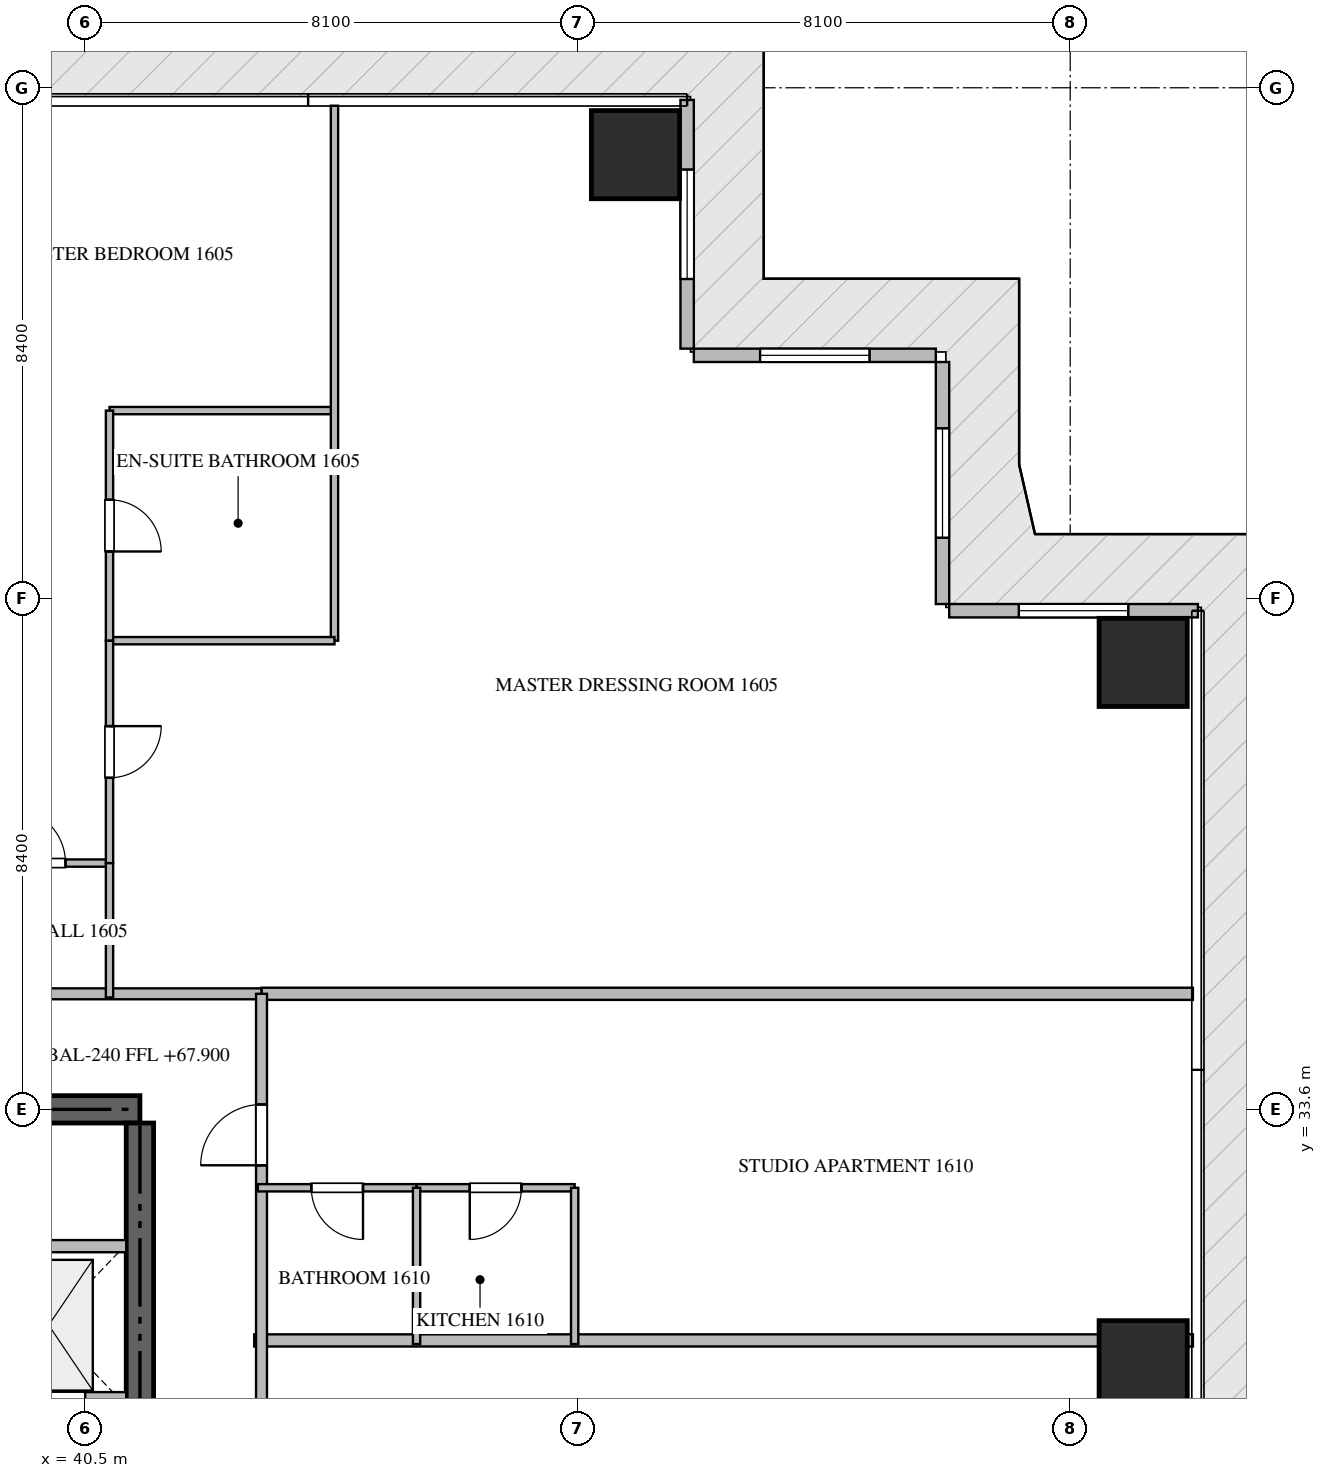
"""IFC4 building model, lengths in metres.
Left out: names, types, materials, properties, quantities, classifications, styles, units other than length and angle.
Written with IfcOpenShell. Run it as: python <this file> out.ifc"""

import sys

from ifc_helpers import new_model, si_unit, direction, frame, frame_2d, origin, origin_2d, place, context, subcontext, project, spatial, rectangle, extrude, source, transform, mapped, element, fill, save


model = new_model("IFC4")
c1 = context("Model", 3, precision=1e-05, world=origin(), true_north=direction((0.0, 1.0)))
c2 = subcontext(c1, "Body", "Model", "MODEL_VIEW")
j1 = project(units=[si_unit("LENGTHUNIT", "METRE"), si_unit("PLANEANGLEUNIT", "RADIAN")], contexts=[c1])
p1 = place(None, origin())
s1 = spatial("IfcSite", under=j1, at=p1, CompositionType="ELEMENT")
p2 = place(p1, origin())
s2 = spatial("IfcBuilding", under=s1, at=p2, CompositionType="ELEMENT")
p3 = place(p2, frame((0.0, 0.0, 67.95)))
s3 = spatial("IfcBuildingStorey", under=s2, at=p3, CompositionType="ELEMENT", Elevation=67.95)
p4 = place(p3, frame((41.4, 33.6, -0.26), z_axis=(0.0, 0.0, 1.0), x_axis=(-1.0, 0.0, 0.0)))
e1 = element("IfcWall", 1, at=p4, inside=s3, PredefinedType="SHEAR", context=c2, shape_type="SweptSolid", body=[
    extrude(rectangle(XDim=18.0, YDim=0.45, at=frame_2d((9.0, 0.0))), origin(), (0.0, 0.0, 1.0), 3.748),
])
p5 = place(p3, frame((41.4, 27.75, -0.26), z_axis=(0.0, 0.0, 1.0), x_axis=(0.0, 1.0, 0.0)))
e2 = element("IfcWall", 2, at=p5, inside=s3, PredefinedType="SHEAR", context=c2, shape_type="SweptSolid", body=[
    extrude(rectangle(XDim=5.625, YDim=0.45, at=frame_2d((2.812, 0.0))), origin(), (0.0, 0.0, 1.0), 3.748),
])
m1 = source(origin(), c2, "Body", "SweptSolid", [
    extrude(rectangle(XDim=1.45, YDim=1.45, at=origin_2d()), origin(), (0.0, 0.0, 1.0), 3.75),
])
for number, where, z_axis, x_axis in (
    (3, (49.55, 49.3, -0.26), (0.0, 0.0, 1.0), (1.0, 0.0, 0.0)),
    (4, (57.9, 29.4, -0.26), (0.0, 0.0, 1.0), (1.0, 0.0, 0.0)),
    (5, (57.9, 40.95, -0.26), (0.0, 0.0, 1.0), (1.0, 0.0, 0.0)),
):
    element("IfcColumn", number, at=place(p3, frame(where, z_axis=z_axis, x_axis=x_axis)), inside=s3, PredefinedType="COLUMN", context=c2, shape_type="MappedRepresentation", body=[
        mapped(m1, transform((0.0, 0.0, 0.0), scale=1.0)),
    ])
p6 = place(p3, frame((58.8, 41.8, 0.0), z_axis=(0.0, 0.0, 1.0), x_axis=(-1.0, 0.0, 0.0)))
e6 = element("IfcWall", 6, at=p6, inside=s3, PredefinedType="ELEMENTEDWALL", context=c2, shape_type="SweptSolid", body=[
    extrude(rectangle(XDim=4.09, YDim=0.22, at=frame_2d((2.045, 0.0))), origin(), (0.0, 0.0, 1.0), 3.475),
])
p7 = place(p6, frame((1.145, 0.0, 0.65)))
e7 = element("IfcOpeningElement", 7, at=p7, cuts=e6, PredefinedType="OPENING", context=c2, shape_type="SweptSolid", body=[
    extrude(rectangle(XDim=1.8, YDim=2.1, at=frame_2d((0.9, 1.05))), frame((0.0, 0.12, 0.0), z_axis=(0.0, -1.0, 0.0), x_axis=(1.0, 0.0, 0.0)), (0.0, 0.0, 1.0), 0.24),
])
p8 = place(p3, frame((54.6, 41.91, 0.0), z_axis=(0.0, 0.0, 1.0), x_axis=(0.0, 1.0, 0.0)))
e8 = element("IfcWall", 8, at=p8, inside=s3, PredefinedType="ELEMENTEDWALL", context=c2, shape_type="SweptSolid", body=[
    extrude(rectangle(XDim=3.98, YDim=0.22, at=frame_2d((1.99, 0.0))), origin(), (0.0, 0.0, 1.0), 3.475),
])
p9 = place(p8, frame((1.09, 0.0, 0.65)))
e9 = element("IfcOpeningElement", 9, at=p9, cuts=e8, PredefinedType="OPENING", context=c2, shape_type="SweptSolid", body=[
    extrude(rectangle(XDim=1.8, YDim=2.1, at=frame_2d((0.9, 1.05))), frame((0.0, 0.12, 0.0), z_axis=(0.0, -1.0, 0.0), x_axis=(1.0, 0.0, 0.0)), (0.0, 0.0, 1.0), 0.24),
])
p10 = place(p3, frame((54.49, 46.0, 0.0), z_axis=(0.0, 0.0, 1.0), x_axis=(-1.0, 0.0, 0.0)))
e10 = element("IfcWall", 10, at=p10, inside=s3, PredefinedType="ELEMENTEDWALL", context=c2, shape_type="SweptSolid", body=[
    extrude(rectangle(XDim=3.98, YDim=0.22, at=frame_2d((1.99, 0.0))), origin(), (0.0, 0.0, 1.0), 3.475),
])
p11 = place(p10, frame((1.09, 0.0, 0.65)))
e11 = element("IfcOpeningElement", 11, at=p11, cuts=e10, PredefinedType="OPENING", context=c2, shape_type="SweptSolid", body=[
    extrude(rectangle(XDim=1.8, YDim=2.1, at=frame_2d((0.9, 1.05))), frame((0.0, 0.12, 0.0), z_axis=(0.0, -1.0, 0.0), x_axis=(1.0, 0.0, 0.0)), (0.0, 0.0, 1.0), 0.24),
])
p12 = place(p3, frame((50.4, 46.11, 0.0), z_axis=(0.0, 0.0, 1.0), x_axis=(0.0, 1.0, 0.0)))
e12 = element("IfcWall", 12, at=p12, inside=s3, PredefinedType="ELEMENTEDWALL", context=c2, shape_type="SweptSolid", body=[
    extrude(rectangle(XDim=4.09, YDim=0.22, at=frame_2d((2.045, 0.0))), origin(), (0.0, 0.0, 1.0), 3.475),
])
p13 = place(p12, frame((1.145, 0.0, 0.65)))
e13 = element("IfcOpeningElement", 13, at=p13, cuts=e12, PredefinedType="OPENING", context=c2, shape_type="SweptSolid", body=[
    extrude(rectangle(XDim=1.8, YDim=2.1, at=frame_2d((0.9, 1.05))), frame((0.0, 0.12, 0.0), z_axis=(0.0, -1.0, 0.0), x_axis=(1.0, 0.0, 0.0)), (0.0, 0.0, 1.0), 0.24),
])
p14 = place(p3, frame((38.75, 28.85, 0.0), z_axis=(0.0, 0.0, 1.0), x_axis=(1.0, 0.0, 0.0)))
e14 = element("IfcWall", 14, at=p14, inside=s3, PredefinedType="STANDARD", context=c2, shape_type="SweptSolid", body=[
    extrude(rectangle(XDim=2.425, YDim=0.2, at=frame_2d((1.212, 0.0))), origin(), (0.0, 0.0, 1.0), 3.49),
])
p15 = place(p14, frame((0.55, 0.0, 0.0)))
e15 = element("IfcOpeningElement", 15, at=p15, cuts=e14, PredefinedType="OPENING", context=c2, shape_type="SweptSolid", body=[
    extrude(rectangle(XDim=1.2, YDim=2.2, at=frame_2d((0.6, 1.1))), frame((0.0, 0.11, 0.0), z_axis=(0.0, -1.0, 0.0), x_axis=(1.0, 0.0, 0.0)), (0.0, 0.0, 1.0), 0.22),
])
p16 = place(p3, frame((38.75, 31.35, 0.0), z_axis=(0.0, 0.0, 1.0), x_axis=(1.0, 0.0, 0.0)))
e16 = element("IfcWall", 16, at=p16, inside=s3, PredefinedType="STANDARD", context=c2, shape_type="SweptSolid", body=[
    extrude(rectangle(XDim=2.425, YDim=0.2, at=frame_2d((1.212, 0.0))), origin(), (0.0, 0.0, 1.0), 3.49),
])
p17 = place(p3, frame((43.28, 29.8, 0.0), z_axis=(0.0, 0.0, 1.0), x_axis=(1.0, 0.0, 0.0)))
e17 = element("IfcWall", 17, at=p17, inside=s3, PredefinedType="PARTITIONING", context=c2, shape_type="SweptSolid", body=[
    extrude(rectangle(XDim=15.438, YDim=0.2, at=frame_2d((7.719, 0.0))), origin(), (0.0, 0.0, 1.0), 3.49),
])
p18 = place(p3, frame((43.4, 35.5, 0.0), z_axis=(0.0, 0.0, 1.0), x_axis=(1.0, 0.0, 0.0)))
e18 = element("IfcWall", 18, at=p18, inside=s3, PredefinedType="PARTITIONING", context=c2, shape_type="SweptSolid", body=[
    extrude(rectangle(XDim=15.318, YDim=0.2, at=frame_2d((7.659, 0.0))), origin(), (0.0, 0.0, 1.0), 3.49),
])
p19 = place(p3, frame((21.402, 35.5, 0.0), z_axis=(0.0, 0.0, 1.0), x_axis=(1.0, 0.0, 0.0)))
e19 = element("IfcWall", 19, at=p19, inside=s3, PredefinedType="PARTITIONING", context=c2, shape_type="SweptSolid", body=[
    extrude(rectangle(XDim=21.996, YDim=0.18, at=frame_2d((10.998, 0.0))), origin(), (0.0, 0.0, 1.0), 3.49),
])
p20 = place(p19, frame((7.202, 0.0, 0.0)))
e20 = element("IfcOpeningElement", 20, at=p20, cuts=e19, PredefinedType="OPENING", context=c2, shape_type="SweptSolid", body=[
    extrude(rectangle(XDim=1.0, YDim=2.15, at=frame_2d((0.5, 1.075))), frame((0.0, 0.1, 0.0), z_axis=(0.0, -1.0, 0.0), x_axis=(1.0, 0.0, 0.0)), (0.0, 0.0, 1.0), 0.2),
])
p21 = place(p3, frame((43.4, 14.9, 0.0), z_axis=(0.0, 0.0, 1.0), x_axis=(0.0, 1.0, 0.0)))
e21 = element("IfcWall", 21, at=p21, inside=s3, PredefinedType="PARTITIONING", context=c2, shape_type="SweptSolid", body=[
    extrude(rectangle(XDim=20.6, YDim=0.18, at=frame_2d((10.3, 0.0))), origin(), (0.0, 0.0, 1.0), 3.49),
])
p22 = place(p21, frame((3.469, 0.0, 0.0)))
e22 = element("IfcOpeningElement", 22, at=p22, cuts=e21, PredefinedType="OPENING", context=c2, shape_type="SweptSolid", body=[
    extrude(rectangle(XDim=1.0, YDim=2.15, at=frame_2d((0.5, 1.075))), frame((0.0, 0.1, 0.0), z_axis=(0.0, -1.0, 0.0), x_axis=(1.0, 0.0, 0.0)), (0.0, 0.0, 1.0), 0.2),
])
p23 = place(p21, frame((11.074, 0.0, 0.0)))
e23 = element("IfcOpeningElement", 23, at=p23, cuts=e21, PredefinedType="OPENING", context=c2, shape_type="SweptSolid", body=[
    extrude(rectangle(XDim=1.0, YDim=2.15, at=frame_2d((0.5, 1.075))), frame((0.0, 0.1, 0.0), z_axis=(0.0, -1.0, 0.0), x_axis=(1.0, 0.0, 0.0)), (0.0, 0.0, 1.0), 0.2),
])
p24 = place(p21, frame((17.78, 0.0, 0.0)))
e24 = element("IfcOpeningElement", 24, at=p24, cuts=e21, PredefinedType="OPENING", context=c2, shape_type="SweptSolid", body=[
    extrude(rectangle(XDim=1.0, YDim=2.15, at=frame_2d((0.5, 1.075))), frame((0.0, 0.1, 0.0), z_axis=(0.0, -1.0, 0.0), x_axis=(1.0, 0.0, 0.0)), (0.0, 0.0, 1.0), 0.2),
])
p25 = place(p3, frame((38.552, 37.65, 0.0), z_axis=(0.0, 0.0, 1.0), x_axis=(1.0, 0.0, 0.0)))
e25 = element("IfcWall", 25, at=p25, inside=s3, PredefinedType="PARTITIONING", context=c2, shape_type="SweptSolid", body=[
    extrude(rectangle(XDim=2.348, YDim=0.12, at=frame_2d((1.174, 0.0))), origin(), (0.0, 0.0, 1.0), 3.49),
])
p26 = place(p25, frame((0.724, 0.0, 0.0)))
e26 = element("IfcOpeningElement", 26, at=p26, cuts=e25, PredefinedType="OPENING", context=c2, shape_type="SweptSolid", body=[
    extrude(rectangle(XDim=0.9, YDim=2.1, at=frame_2d((0.45, 1.05))), frame((0.0, 0.07, 0.0), z_axis=(0.0, -1.0, 0.0), x_axis=(1.0, 0.0, 0.0)), (0.0, 0.0, 1.0), 0.14),
])
p27 = place(p3, frame((40.9, 45.091, 0.0), z_axis=(0.0, 0.0, 1.0), x_axis=(1.0, 0.0, 0.0)))
e27 = element("IfcWall", 27, at=p27, inside=s3, PredefinedType="PARTITIONING", context=c2, shape_type="SweptSolid", body=[
    extrude(rectangle(XDim=3.7, YDim=0.12, at=frame_2d((1.85, 0.0))), origin(), (0.0, 0.0, 1.0), 3.49),
])
p28 = place(p3, frame((44.6, 50.105, 0.0), z_axis=(0.0, 0.0, 1.0), x_axis=(0.0, -1.0, 0.0)))
e28 = element("IfcWall", 28, at=p28, inside=s3, PredefinedType="PARTITIONING", context=c2, shape_type="SweptSolid", body=[
    extrude(rectangle(XDim=8.798, YDim=0.12, at=frame_2d((4.399, 0.0))), origin(), (0.0, 0.0, 1.0), 3.49),
])
p29 = place(p3, frame((40.9, 41.307, 0.0), z_axis=(0.0, 0.0, 1.0), x_axis=(1.0, 0.0, 0.0)))
e29 = element("IfcWall", 29, at=p29, inside=s3, PredefinedType="PARTITIONING", context=c2, shape_type="SweptSolid", body=[
    extrude(rectangle(XDim=3.7, YDim=0.12, at=frame_2d((1.85, 0.0))), origin(), (0.0, 0.0, 1.0), 3.49),
])
p30 = place(p3, frame((40.9, 45.091, 0.0), z_axis=(0.0, 0.0, 1.0), x_axis=(0.0, -1.0, 0.0)))
e30 = element("IfcWall", 30, at=p30, inside=s3, PredefinedType="PARTITIONING", context=c2, shape_type="SweptSolid", body=[
    extrude(rectangle(XDim=3.784, YDim=0.12, at=frame_2d((1.892, 0.0))), origin(), (0.0, 0.0, 1.0), 3.49),
])
p31 = place(p30, frame((1.467, 0.0, 0.0)))
e31 = element("IfcOpeningElement", 31, at=p31, cuts=e30, PredefinedType="OPENING", context=c2, shape_type="SweptSolid", body=[
    extrude(rectangle(XDim=0.85, YDim=2.1, at=frame_2d((0.425, 1.05))), frame((0.0, 0.07, 0.0), z_axis=(0.0, -1.0, 0.0), x_axis=(1.0, 0.0, 0.0)), (0.0, 0.0, 1.0), 0.14),
])
p32 = place(p3, frame((40.9, 41.305, 0.0), z_axis=(0.0, 0.0, 1.0), x_axis=(0.0, -1.0, 0.0)))
e32 = element("IfcWall", 32, at=p32, inside=s3, PredefinedType="PARTITIONING", context=c2, shape_type="SweptSolid", body=[
    extrude(rectangle(XDim=3.655, YDim=0.12, at=frame_2d((1.828, 0.0))), origin(), (0.0, 0.0, 1.0), 3.49),
])
p33 = place(p32, frame((1.403, 0.0, 0.0)))
e33 = element("IfcOpeningElement", 33, at=p33, cuts=e32, PredefinedType="OPENING", context=c2, shape_type="SweptSolid", body=[
    extrude(rectangle(XDim=0.85, YDim=2.1, at=frame_2d((0.425, 1.05))), frame((0.0, 0.07, 0.0), z_axis=(0.0, -1.0, 0.0), x_axis=(1.0, 0.0, 0.0)), (0.0, 0.0, 1.0), 0.14),
])
p34 = place(p3, frame((40.9, 37.648, 0.0), z_axis=(0.0, 0.0, 1.0), x_axis=(0.0, -1.0, 0.0)))
e34 = element("IfcWall", 34, at=p34, inside=s3, PredefinedType="PARTITIONING", context=c2, shape_type="SweptSolid", body=[
    extrude(rectangle(XDim=2.208, YDim=0.12, at=frame_2d((1.104, 0.0))), origin(), (0.0, 0.0, 1.0), 3.49),
])
p35 = place(p3, frame((48.55, 32.31, 0.0), z_axis=(0.0, 0.0, 1.0), x_axis=(-1.0, 0.0, 0.0)))
e35 = element("IfcWall", 35, at=p35, inside=s3, PredefinedType="PARTITIONING", context=c2, shape_type="SweptSolid", body=[
    extrude(rectangle(XDim=2.6, YDim=0.12, at=frame_2d((1.3, 0.0))), origin(), (0.0, 0.0, 1.0), 3.49),
])
p36 = place(p35, frame((0.875, 0.0, 0.0)))
e36 = element("IfcOpeningElement", 36, at=p36, cuts=e35, PredefinedType="OPENING", context=c2, shape_type="SweptSolid", body=[
    extrude(rectangle(XDim=0.85, YDim=2.1, at=frame_2d((0.425, 1.05))), frame((0.0, 0.07, 0.0), z_axis=(0.0, -1.0, 0.0), x_axis=(1.0, 0.0, 0.0)), (0.0, 0.0, 1.0), 0.14),
])
p37 = place(p3, frame((45.948, 32.31, 0.0), z_axis=(0.0, 0.0, 1.0), x_axis=(-1.0, 0.0, 0.0)))
e37 = element("IfcWall", 37, at=p37, inside=s3, PredefinedType="PARTITIONING", context=c2, shape_type="SweptSolid", body=[
    extrude(rectangle(XDim=2.608, YDim=0.12, at=frame_2d((1.304, 0.0))), origin(), (0.0, 0.0, 1.0), 3.49),
])
p38 = place(p37, frame((0.879, 0.0, 0.0)))
e38 = element("IfcOpeningElement", 38, at=p38, cuts=e37, PredefinedType="OPENING", context=c2, shape_type="SweptSolid", body=[
    extrude(rectangle(XDim=0.85, YDim=2.1, at=frame_2d((0.425, 1.05))), frame((0.0, 0.07, 0.0), z_axis=(0.0, -1.0, 0.0), x_axis=(1.0, 0.0, 0.0)), (0.0, 0.0, 1.0), 0.14),
])
for number, where, z_axis, x_axis in (
    (39, (45.95, 29.74, 0.0), (0.0, 0.0, 1.0), (0.0, 1.0, 0.0)),
    (40, (48.55, 29.74, 0.0), (0.0, 0.0, 1.0), (0.0, 1.0, 0.0)),
):
    element("IfcWall", number, at=place(p3, frame(where, z_axis=z_axis, x_axis=x_axis)), inside=s3, PredefinedType="PARTITIONING", context=c2, shape_type="SweptSolid", body=[
        extrude(rectangle(XDim=2.57, YDim=0.12, at=frame_2d((1.285, 0.0))), origin(), (0.0, 0.0, 1.0), 3.49),
    ])
m2 = source(origin(), c2, "Body", "SweptSolid", [
    extrude(rectangle(XDim=1.8, YDim=2.1, at=frame_2d((0.9, 1.05))), frame((0.0, 0.03, 0.0), z_axis=(0.0, -1.0, 0.0), x_axis=(1.0, 0.0, 0.0)), (0.0, 0.0, 1.0), 0.06),
])
p39 = place(p7, origin())
e41 = element("IfcWindow", 41, at=p39, inside=s3, PartitioningType="SINGLE_PANEL", PredefinedType="WINDOW", context=c2, shape_type="MappedRepresentation", body=[
    mapped(m2, transform((0.0, 0.0, 0.0), scale=1.0)),
])
fill(e7, e41)
p40 = place(p9, origin())
e42 = element("IfcWindow", 42, at=p40, inside=s3, PartitioningType="SINGLE_PANEL", PredefinedType="WINDOW", context=c2, shape_type="MappedRepresentation", body=[
    mapped(m2, transform((0.0, 0.0, 0.0), scale=1.0)),
])
fill(e9, e42)
p41 = place(p11, origin())
e43 = element("IfcWindow", 43, at=p41, inside=s3, PartitioningType="SINGLE_PANEL", PredefinedType="WINDOW", context=c2, shape_type="MappedRepresentation", body=[
    mapped(m2, transform((0.0, 0.0, 0.0), scale=1.0)),
])
fill(e11, e43)
p42 = place(p13, origin())
e44 = element("IfcWindow", 44, at=p42, inside=s3, PartitioningType="SINGLE_PANEL", PredefinedType="WINDOW", context=c2, shape_type="MappedRepresentation", body=[
    mapped(m2, transform((0.0, 0.0, 0.0), scale=1.0)),
])
fill(e13, e44)
m3 = source(origin(), c2, "Body", "SweptSolid", [
    extrude(rectangle(XDim=1.2, YDim=2.2, at=frame_2d((0.6, 1.1))), frame((0.0, 0.025, 0.0), z_axis=(0.0, -1.0, 0.0), x_axis=(1.0, 0.0, 0.0)), (0.0, 0.0, 1.0), 0.05),
])
p43 = place(p15, origin())
e45 = element("IfcDoor", 45, at=p43, inside=s3, OperationType="DOUBLE_DOOR_SLIDING", PredefinedType="DOOR", context=c2, shape_type="MappedRepresentation", body=[
    mapped(m3, transform((0.0, 0.0, 0.0), scale=1.0)),
])
fill(e15, e45)
m4 = source(origin(), c2, "Body", "SweptSolid", [
    extrude(rectangle(XDim=1.0, YDim=2.15, at=frame_2d((0.5, 1.075))), frame((0.0, 0.025, 0.0), z_axis=(0.0, -1.0, 0.0), x_axis=(1.0, 0.0, 0.0)), (0.0, 0.0, 1.0), 0.05),
])
p44 = place(p24, origin())
e46 = element("IfcDoor", 46, at=p44, inside=s3, OperationType="SINGLE_SWING_LEFT", PredefinedType="DOOR", context=c2, shape_type="MappedRepresentation", body=[
    mapped(m4, transform((0.0, 0.0, 0.0), scale=1.0)),
])
fill(e24, e46)
m5 = source(origin(), c2, "Body", "SweptSolid", [
    extrude(rectangle(XDim=0.9, YDim=2.1, at=frame_2d((0.45, 1.05))), frame((0.0, 0.025, 0.0), z_axis=(0.0, -1.0, 0.0), x_axis=(1.0, 0.0, 0.0)), (0.0, 0.0, 1.0), 0.05),
])
p45 = place(p26, origin())
e47 = element("IfcDoor", 47, at=p45, inside=s3, OperationType="SINGLE_SWING_LEFT", PredefinedType="DOOR", context=c2, shape_type="MappedRepresentation", body=[
    mapped(m5, transform((0.0, 0.0, 0.0), scale=1.0)),
])
fill(e26, e47)
m6 = source(origin(), c2, "Body", "SweptSolid", [
    extrude(rectangle(XDim=0.85, YDim=2.1, at=frame_2d((0.425, 1.05))), frame((0.0, 0.025, 0.0), z_axis=(0.0, -1.0, 0.0), x_axis=(1.0, 0.0, 0.0)), (0.0, 0.0, 1.0), 0.05),
])
p46 = place(p31, origin())
e48 = element("IfcDoor", 48, at=p46, inside=s3, OperationType="SINGLE_SWING_RIGHT", PredefinedType="DOOR", context=c2, shape_type="MappedRepresentation", body=[
    mapped(m6, transform((0.0, 0.0, 0.0), scale=1.0)),
])
fill(e31, e48)
p47 = place(p33, origin())
e49 = element("IfcDoor", 49, at=p47, inside=s3, OperationType="SINGLE_SWING_LEFT", PredefinedType="DOOR", context=c2, shape_type="MappedRepresentation", body=[
    mapped(m6, transform((0.0, 0.0, 0.0), scale=1.0)),
])
fill(e33, e49)
p48 = place(p36, origin())
e50 = element("IfcDoor", 50, at=p48, inside=s3, OperationType="SINGLE_SWING_RIGHT", PredefinedType="DOOR", context=c2, shape_type="MappedRepresentation", body=[
    mapped(m6, transform((0.0, 0.0, 0.0), scale=1.0)),
])
fill(e36, e50)
p49 = place(p38, origin())
e51 = element("IfcDoor", 51, at=p49, inside=s3, OperationType="SINGLE_SWING_LEFT", PredefinedType="DOOR", context=c2, shape_type="MappedRepresentation", body=[
    mapped(m6, transform((0.0, 0.0, 0.0), scale=1.0)),
])
fill(e38, e51)
save(model, sys.argv[1])
